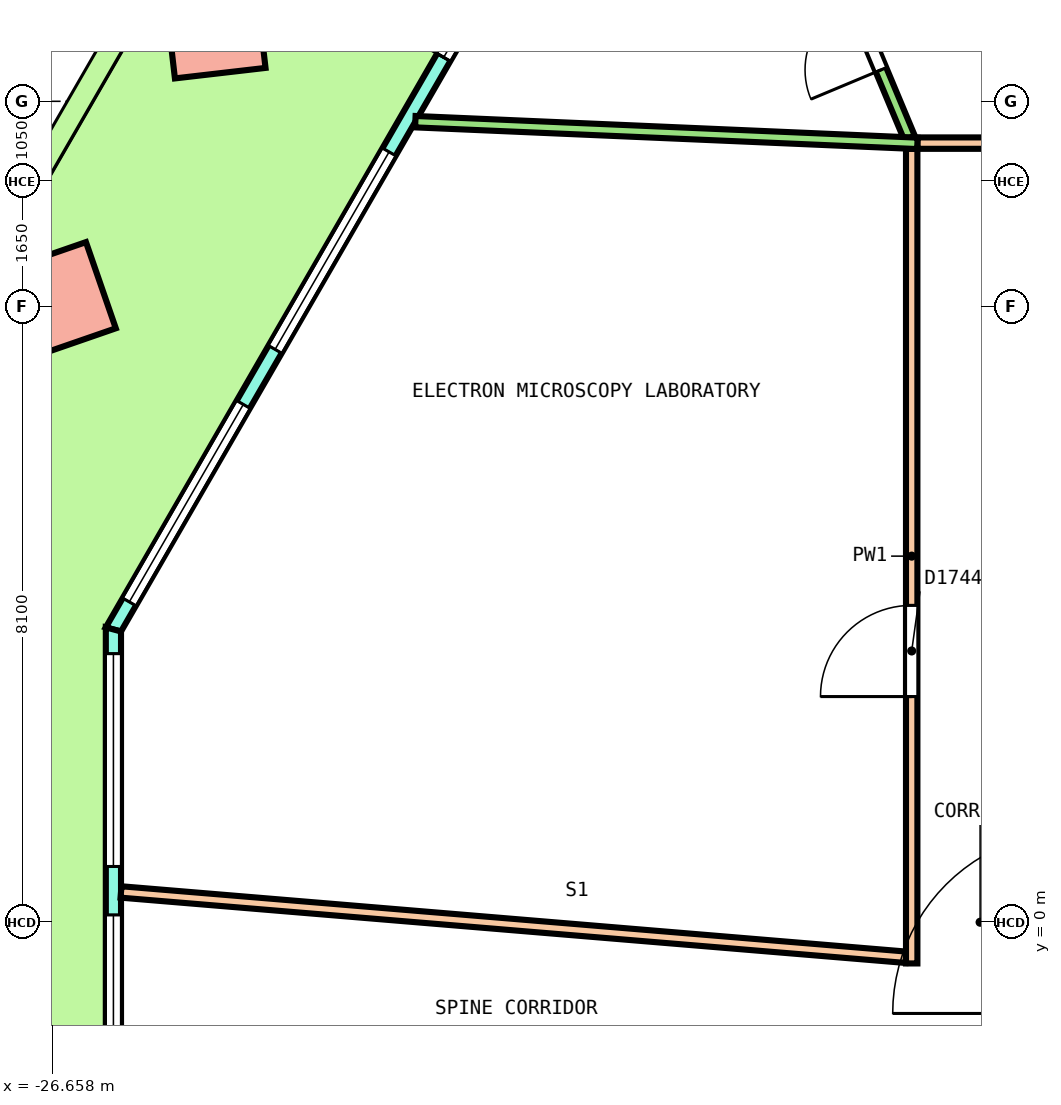
"""IFC4 building model, lengths in metres.
Left out: names, types, materials, properties, quantities, classifications, styles, units other than length and angle.
Written with IfcOpenShell. Run it as: python <this file> out.ifc"""

import sys

from ifc_helpers import new_model, si_unit, direction, frame, frame_2d, origin, origin_2d, place, context, subcontext, project, spatial, polyline, rectangle, outline, extrude, element, fill, save


model = new_model("IFC4")
c1 = context("Model", 3, precision=1e-05, world=origin(), true_north=direction((0.0, 1.0)))
c2 = subcontext(c1, "Body", "Model", "MODEL_VIEW")
j1 = project(units=[si_unit("LENGTHUNIT", "METRE"), si_unit("PLANEANGLEUNIT", "RADIAN")], contexts=[c1])
p1 = place(None, origin())
s1 = spatial("IfcSite", under=j1, at=p1, CompositionType="ELEMENT")
p2 = place(p1, origin())
s2 = spatial("IfcBuilding", under=s1, at=p2, CompositionType="ELEMENT")
p3 = place(p2, frame((0.0, 0.0, 158.4)))
s3 = spatial("IfcBuildingStorey", under=s2, at=p3, CompositionType="ELEMENT", Elevation=158.4)
p4 = place(p3, frame((-24.516, 11.766, 0.0), z_axis=(-0.025365582388, 0.018858497119, 0.999500347332), x_axis=(-0.500321526885, -0.865832042738, 0.003639162491)))
e1 = element("IfcColumn", 1, at=p4, inside=s3, PredefinedType="COLUMN", context=c2, shape_type="SweptSolid", body=[
    extrude(rectangle(XDim=1.2, YDim=1.2, at=origin_2d()), origin(), (0.0, 0.0, 1.0), 4.052),
])
p5 = place(p3, frame((-26.584, 8.184, 0.0), z_axis=(-0.021749390218, 0.025123256844, 0.9994477405), x_axis=(-0.500502362591, -0.865666942435, 0.01086875412)))
e2 = element("IfcColumn", 2, at=p5, inside=s3, PredefinedType="COLUMN", context=c2, shape_type="SweptSolid", body=[
    extrude(rectangle(XDim=1.2, YDim=1.2, at=origin_2d()), origin(), (0.0, 0.0, 1.0), 4.052),
])
p6 = place(p3, frame((-16.262, 20.463, 0.0), z_axis=(0.0, 0.0, 1.0), x_axis=(-0.499998279088, -0.866026397351, 0.0)))
e3 = element("IfcWall", 3, at=p6, inside=s3, PredefinedType="SOLIDWALL", context=c2, shape_type="SweptSolid", body=[
    extrude(outline(polyline([(-0.027, -0.1), (0.985, -0.1), (1.998, -0.1), (3.01, -0.1), (4.022, -0.1), (5.035, -0.1), (6.047, -0.1), (7.059, -0.1), (8.072, -0.1), (9.084, -0.1), (10.096, -0.1), (11.109, -0.1), (12.121, -0.1), (13.133, -0.1), (14.146, -0.1), (15.158, -0.1), (16.17, -0.1), (17.182, -0.1), (18.195, -0.1), (19.207, -0.1), (19.153, 0.1), (18.147, 0.1), (17.14, 0.1), (16.133, 0.1), (15.127, 0.1), (14.12, 0.1), (13.113, 0.1), (12.107, 0.1), (11.1, 0.1), (10.094, 0.1), (9.087, 0.1), (8.08, 0.1), (7.073, 0.1), (6.067, 0.1), (5.06, 0.1), (4.053, 0.1), (3.047, 0.1), (2.04, 0.1), (1.033, 0.1), (0.027, 0.1), (-0.027, -0.1)])), origin(), (0.0, 0.0, 1.0), 4.1),
])
p7 = place(p6, frame((0.418, 0.0, 0.1)))
e4 = element("IfcOpeningElement", 4, at=p7, cuts=e3, PredefinedType="OPENING", context=c2, shape_type="SweptSolid", body=[
    extrude(rectangle(XDim=3.0, YDim=2.9, at=frame_2d((1.5, 1.45))), frame((0.0, 0.11, 0.0), z_axis=(0.0, -1.0, 0.0), x_axis=(1.0, 0.0, 0.0)), (0.0, 0.0, 1.0), 0.22),
])
p8 = place(p6, frame((4.254, 0.0, 0.1)))
e5 = element("IfcOpeningElement", 5, at=p8, cuts=e3, PredefinedType="OPENING", context=c2, shape_type="SweptSolid", body=[
    extrude(rectangle(XDim=3.0, YDim=2.9, at=frame_2d((1.5, 1.45))), frame((0.0, 0.11, 0.0), z_axis=(0.0, -1.0, 0.0), x_axis=(1.0, 0.0, 0.0)), (0.0, 0.0, 1.0), 0.22),
])
p9 = place(p6, frame((8.69, 0.0, 0.0)))
e6 = element("IfcOpeningElement", 6, at=p9, cuts=e3, PredefinedType="OPENING", context=c2, shape_type="SweptSolid", body=[
    extrude(rectangle(XDim=1.8, YDim=2.4, at=frame_2d((0.9, 1.2))), frame((0.0, 0.11, 0.0), z_axis=(0.0, -1.0, 0.0), x_axis=(1.0, 0.0, 0.0)), (0.0, 0.0, 1.0), 0.22),
])
p10 = place(p6, frame((8.69, 0.0, 2.55)))
e7 = element("IfcOpeningElement", 7, at=p10, cuts=e3, PredefinedType="OPENING", context=c2, shape_type="SweptSolid", body=[
    extrude(rectangle(XDim=1.8, YDim=0.45, at=frame_2d((0.9, 0.225))), frame((0.0, 0.11, 0.0), z_axis=(0.0, -1.0, 0.0), x_axis=(1.0, 0.0, 0.0)), (0.0, 0.0, 1.0), 0.22),
])
p11 = place(p6, frame((11.926, 0.0, 0.1)))
e8 = element("IfcOpeningElement", 8, at=p11, cuts=e3, PredefinedType="OPENING", context=c2, shape_type="SweptSolid", body=[
    extrude(rectangle(XDim=3.0, YDim=2.9, at=frame_2d((1.5, 1.45))), frame((0.0, 0.11, 0.0), z_axis=(0.0, -1.0, 0.0), x_axis=(1.0, 0.0, 0.0)), (0.0, 0.0, 1.0), 0.22),
])
p12 = place(p6, frame((15.762, 0.0, 0.1)))
e9 = element("IfcOpeningElement", 9, at=p12, cuts=e3, PredefinedType="OPENING", context=c2, shape_type="SweptSolid", body=[
    extrude(rectangle(XDim=3.0, YDim=2.9, at=frame_2d((1.5, 1.45))), frame((0.0, 0.11, 0.0), z_axis=(0.0, -1.0, 0.0), x_axis=(1.0, 0.0, 0.0)), (0.0, 0.0, 1.0), 0.22),
])
p13 = place(p3, frame((-25.852, 3.852, 0.0), z_axis=(0.0, 0.0, 1.0), x_axis=(0.0, -1.0, 0.0)))
e10 = element("IfcWall", 10, at=p13, inside=s3, PredefinedType="SOLIDWALL", context=c2, shape_type="SweptSolid", body=[
    extrude(outline(polyline([(-0.027, -0.1), (1.128, -0.1), (2.282, -0.1), (3.437, -0.1), (4.592, -0.1), (5.747, -0.1), (6.901, -0.1), (6.848, 0.1), (5.711, 0.1), (4.574, 0.1), (3.437, 0.1), (2.301, 0.1), (1.164, 0.1), (0.027, 0.1), (-0.027, -0.1)])), origin(), (0.0, 0.0, 1.0), 4.1),
])
p14 = place(p13, frame((0.319, 0.0, 0.1)))
e11 = element("IfcOpeningElement", 11, at=p14, cuts=e10, PredefinedType="OPENING", context=c2, shape_type="SweptSolid", body=[
    extrude(rectangle(XDim=2.8, YDim=2.9, at=frame_2d((1.4, 1.45))), frame((0.0, 0.11, 0.0), z_axis=(0.0, -1.0, 0.0), x_axis=(1.0, 0.0, 0.0)), (0.0, 0.0, 1.0), 0.22),
])
p15 = place(p13, frame((3.756, 0.0, 0.1)))
e12 = element("IfcOpeningElement", 12, at=p15, cuts=e10, PredefinedType="OPENING", context=c2, shape_type="SweptSolid", body=[
    extrude(rectangle(XDim=2.8, YDim=2.9, at=frame_2d((1.4, 1.45))), frame((0.0, 0.11, 0.0), z_axis=(0.0, -1.0, 0.0), x_axis=(1.0, 0.0, 0.0)), (0.0, 0.0, 1.0), 0.22),
])
p16 = place(p3, frame((-25.752, 0.398, 0.0), z_axis=(0.0, 0.0, 1.0), x_axis=(0.996557608681, -0.082903151815, 0.0)))
e13 = element("IfcWall", 13, at=p16, inside=s3, PredefinedType="PARTITIONING", context=c2, shape_type="SweptSolid", body=[
    extrude(rectangle(XDim=10.363, YDim=0.15, at=frame_2d((5.182, 0.0))), origin(), (0.0, 0.0, 1.0), 3.05),
])
p17 = place(p3, frame((-15.275, 10.25, 0.0), z_axis=(0.0, 0.0, 1.0), x_axis=(1.0, 0.0, 0.0)))
e14 = element("IfcWall", 14, at=p17, inside=s3, PredefinedType="PARTITIONING", context=c2, shape_type="SweptSolid", body=[
    extrude(rectangle(XDim=30.55, YDim=0.15, at=frame_2d((15.275, 0.0))), origin(), (0.0, 0.0, 1.0), 3.05),
])
p18 = place(p17, frame((26.789, 0.0, 0.0)))
e15 = element("IfcOpeningElement", 15, at=p18, cuts=e14, PredefinedType="OPENING", context=c2, shape_type="SweptSolid", body=[
    extrude(rectangle(XDim=1.0, YDim=2.1, at=frame_2d((0.5, 1.05))), frame((0.0, 0.085, 0.0), z_axis=(0.0, -1.0, 0.0), x_axis=(1.0, 0.0, 0.0)), (0.0, 0.0, 1.0), 0.17),
])
p19 = place(p17, frame((14.675, 0.0, 0.0)))
e16 = element("IfcOpeningElement", 16, at=p19, cuts=e14, PredefinedType="OPENING", context=c2, shape_type="SweptSolid", body=[
    extrude(rectangle(XDim=1.2, YDim=2.1, at=frame_2d((0.6, 1.05))), frame((0.0, 0.085, 0.0), z_axis=(0.0, -1.0, 0.0), x_axis=(1.0, 0.0, 0.0)), (0.0, 0.0, 1.0), 0.17),
])
p20 = place(p17, frame((2.429, 0.0, 0.0)))
e17 = element("IfcOpeningElement", 17, at=p20, cuts=e14, PredefinedType="OPENING", context=c2, shape_type="SweptSolid", body=[
    extrude(rectangle(XDim=1.0, YDim=2.1, at=frame_2d((0.5, 1.05))), frame((0.0, 0.085, 0.0), z_axis=(0.0, -1.0, 0.0), x_axis=(1.0, 0.0, 0.0)), (0.0, 0.0, 1.0), 0.17),
])
p21 = place(p3, frame((-15.35, -0.542, 0.0), z_axis=(0.0, 0.0, 1.0), x_axis=(0.0, 1.0, 0.0)))
e18 = element("IfcWall", 18, at=p21, inside=s3, PredefinedType="PARTITIONING", context=c2, shape_type="SweptSolid", body=[
    extrude(rectangle(XDim=10.717, YDim=0.15, at=frame_2d((5.359, 0.0))), origin(), (0.0, 0.0, 1.0), 3.05),
])
p22 = place(p21, frame((3.511, 0.0, 0.0)))
e19 = element("IfcOpeningElement", 19, at=p22, cuts=e18, PredefinedType="OPENING", context=c2, shape_type="SweptSolid", body=[
    extrude(rectangle(XDim=1.2, YDim=2.1, at=frame_2d((0.6, 1.05))), frame((0.0, 0.085, 0.0), z_axis=(0.0, -1.0, 0.0), x_axis=(1.0, 0.0, 0.0)), (0.0, 0.0, 1.0), 0.17),
])
p23 = place(p3, frame((-18.162, 16.972, 0.0), z_axis=(0.0, 0.0, 1.0), x_axis=(0.385884187842, -0.92254723108, 0.0)))
e20 = element("IfcWall", 20, at=p23, inside=s3, PredefinedType="PARTITIONING", context=c2, shape_type="SweptSolid", body=[
    extrude(rectangle(XDim=7.212, YDim=0.15, at=frame_2d((3.606, 0.0))), origin(), (0.0, 0.0, 1.0), 3.05),
])
p24 = place(p23, frame((5.242, 0.0, 0.0)))
e21 = element("IfcOpeningElement", 21, at=p24, cuts=e20, PredefinedType="OPENING", context=c2, shape_type="SweptSolid", body=[
    extrude(rectangle(XDim=1.0, YDim=2.1, at=frame_2d((0.5, 1.05))), frame((0.0, 0.085, 0.0), z_axis=(0.0, -1.0, 0.0), x_axis=(1.0, 0.0, 0.0)), (0.0, 0.0, 1.0), 0.17),
])
p25 = place(p3, frame((-21.88, 10.532, 0.0), z_axis=(0.0, 0.0, 1.0), x_axis=(0.999069350549, -0.043132734584, 0.0)))
e22 = element("IfcWall", 22, at=p25, inside=s3, PredefinedType="PARTITIONING", context=c2, shape_type="SweptSolid", body=[
    extrude(rectangle(XDim=6.611, YDim=0.15, at=frame_2d((3.306, 0.0))), origin(), (0.0, 0.0, 1.0), 3.05),
])
p26 = place(p9, origin())
e23 = element("IfcDoor", 23, at=p26, inside=s3, OperationType="DOUBLE_DOOR_SINGLE_SWING", PredefinedType="DOOR", context=c2, shape_type="SweptSolid", body=[
    extrude(rectangle(XDim=1.8, YDim=2.4, at=frame_2d((0.9, 1.2))), frame((0.0, 0.025, 0.0), z_axis=(0.0, -1.0, 0.0), x_axis=(1.0, 0.0, 0.0)), (0.0, 0.0, 1.0), 0.05),
])
fill(e6, e23)
p27 = place(p10, origin())
e24 = element("IfcWindow", 24, at=p27, inside=s3, PartitioningType="SINGLE_PANEL", PredefinedType="WINDOW", context=c2, shape_type="SweptSolid", body=[
    extrude(rectangle(XDim=1.8, YDim=0.45, at=frame_2d((0.9, 0.225))), frame((0.0, 0.03, 0.0), z_axis=(0.0, -1.0, 0.0), x_axis=(1.0, 0.0, 0.0)), (0.0, 0.0, 1.0), 0.06),
])
fill(e7, e24)
p28 = place(p11, origin())
e25 = element("IfcWindow", 25, at=p28, inside=s3, PartitioningType="SINGLE_PANEL", PredefinedType="WINDOW", context=c2, shape_type="SweptSolid", body=[
    extrude(rectangle(XDim=3.0, YDim=2.9, at=frame_2d((1.5, 1.45))), frame((0.0, 0.03, 0.0), z_axis=(0.0, -1.0, 0.0), x_axis=(1.0, 0.0, 0.0)), (0.0, 0.0, 1.0), 0.06),
])
fill(e8, e25)
p29 = place(p12, origin())
e26 = element("IfcWindow", 26, at=p29, inside=s3, PartitioningType="SINGLE_PANEL", PredefinedType="WINDOW", context=c2, shape_type="SweptSolid", body=[
    extrude(rectangle(XDim=3.0, YDim=2.9, at=frame_2d((1.5, 1.45))), frame((0.0, 0.03, 0.0), z_axis=(0.0, -1.0, 0.0), x_axis=(1.0, 0.0, 0.0)), (0.0, 0.0, 1.0), 0.06),
])
fill(e9, e26)
p30 = place(p14, origin())
e27 = element("IfcWindow", 27, at=p30, inside=s3, PartitioningType="SINGLE_PANEL", PredefinedType="WINDOW", context=c2, shape_type="SweptSolid", body=[
    extrude(rectangle(XDim=2.8, YDim=2.9, at=frame_2d((1.4, 1.45))), frame((0.0, 0.03, 0.0), z_axis=(0.0, -1.0, 0.0), x_axis=(1.0, 0.0, 0.0)), (0.0, 0.0, 1.0), 0.06),
])
fill(e11, e27)
p31 = place(p15, origin())
e28 = element("IfcWindow", 28, at=p31, inside=s3, PartitioningType="SINGLE_PANEL", PredefinedType="WINDOW", context=c2, shape_type="SweptSolid", body=[
    extrude(rectangle(XDim=2.8, YDim=2.9, at=frame_2d((1.4, 1.45))), frame((0.0, 0.03, 0.0), z_axis=(0.0, -1.0, 0.0), x_axis=(1.0, 0.0, 0.0)), (0.0, 0.0, 1.0), 0.06),
])
fill(e12, e28)
p32 = place(p24, origin())
e29 = element("IfcDoor", 29, at=p32, inside=s3, OperationType="SINGLE_SWING_RIGHT", PredefinedType="DOOR", context=c2, shape_type="SweptSolid", body=[
    extrude(rectangle(XDim=1.0, YDim=2.1, at=frame_2d((0.5, 1.05))), frame((0.0, 0.025, 0.0), z_axis=(0.0, -1.0, 0.0), x_axis=(1.0, 0.0, 0.0)), (0.0, 0.0, 1.0), 0.05),
])
fill(e21, e29)
p33 = place(p22, origin())
e30 = element("IfcDoor", 30, at=p33, inside=s3, OperationType="DOUBLE_DOOR_SINGLE_SWING", PredefinedType="DOOR", context=c2, shape_type="SweptSolid", body=[
    extrude(rectangle(XDim=1.2, YDim=2.1, at=frame_2d((0.6, 1.05))), frame((0.0, 0.025, 0.0), z_axis=(0.0, -1.0, 0.0), x_axis=(1.0, 0.0, 0.0)), (0.0, 0.0, 1.0), 0.05),
])
fill(e19, e30)
save(model, sys.argv[1])
